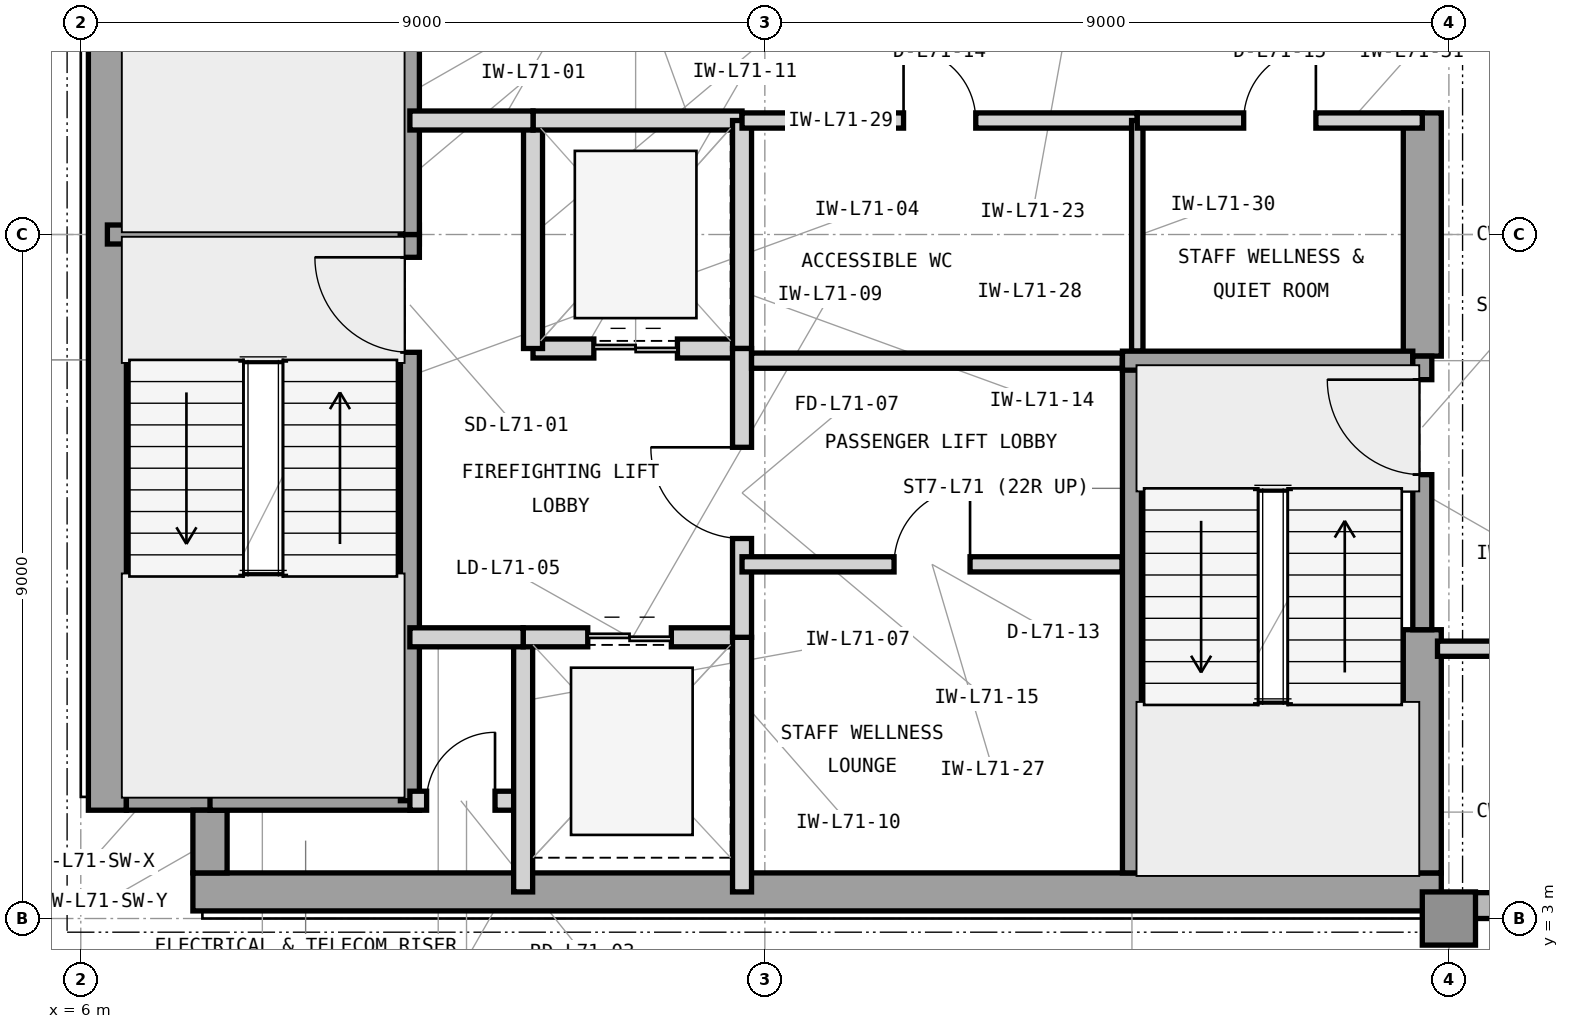
"""IFC4 building model, lengths in metres.
Left out: names, types, materials, properties, quantities, classifications, styles, units other than length and angle.
Written with IfcOpenShell. Run it as: python <this file> out.ifc"""

import sys

from ifc_helpers import new_model, si_unit, direction, frame, frame_2d, origin, origin_2d, place, context, subcontext, project, spatial, rectangle, extrude, element, fill, save


model = new_model("IFC4")
c1 = context("Model", 3, precision=1e-05, world=origin(), true_north=direction((0.0, 1.0)))
c2 = subcontext(c1, "Body", "Model", "MODEL_VIEW")
j1 = project(units=[si_unit("LENGTHUNIT", "METRE"), si_unit("PLANEANGLEUNIT", "RADIAN")], contexts=[c1])
p1 = place(None, origin())
s1 = spatial("IfcSite", under=j1, at=p1, CompositionType="ELEMENT")
p2 = place(p1, origin())
s2 = spatial("IfcBuilding", under=s1, at=p2, CompositionType="ELEMENT")
p3 = place(p2, frame((0.0, 0.0, 289.8)))
s3 = spatial("IfcBuildingStorey", under=s2, at=p3, CompositionType="ELEMENT", Elevation=289.8)
p4 = place(p3, frame((7.475, 3.35, 0.0), z_axis=(0.0, 0.0, 1.0), x_axis=(1.0, 0.0, 0.0)))
e1 = element("IfcWall", 1, at=p4, inside=s3, PredefinedType="SHEAR", context=c2, shape_type="SweptSolid", body=[
    extrude(rectangle(XDim=16.425, YDim=0.5, at=frame_2d((8.212, 0.0))), origin(), (0.0, 0.0, 1.0), 3.9),
])
p5 = place(p3, frame((6.35, 4.425, 0.0), z_axis=(0.0, 0.0, 1.0), x_axis=(0.0, 1.0, 0.0)))
e2 = element("IfcWall", 2, at=p5, inside=s3, PredefinedType="SHEAR", context=c2, shape_type="SweptSolid", body=[
    extrude(rectangle(XDim=15.15, YDim=0.5, at=frame_2d((7.575, 0.0))), origin(), (0.0, 0.0, 1.0), 3.9),
])
p6 = place(p3, frame((23.65, 3.6, 0.0), z_axis=(0.0, 0.0, 1.0), x_axis=(0.0, 1.0, 0.0)))
e3 = element("IfcWall", 3, at=p6, inside=s3, PredefinedType="SHEAR", context=c2, shape_type="SweptSolid", body=[
    extrude(rectangle(XDim=3.2, YDim=0.5, at=frame_2d((1.6, 0.0))), origin(), (0.0, 0.0, 1.0), 3.9),
])
p7 = place(p3, frame((23.65, 10.4, 0.0), z_axis=(0.0, 0.0, 1.0), x_axis=(0.0, 1.0, 0.0)))
e4 = element("IfcWall", 4, at=p7, inside=s3, PredefinedType="SHEAR", context=c2, shape_type="SweptSolid", body=[
    extrude(rectangle(XDim=3.2, YDim=0.5, at=frame_2d((1.6, 0.0))), origin(), (0.0, 0.0, 1.0), 3.9),
])
p8 = place(p3, frame((6.6, 4.65, 0.0), z_axis=(0.0, 0.0, 1.0), x_axis=(1.0, 0.0, 0.0)))
e5 = element("IfcWall", 5, at=p8, inside=s3, PredefinedType="SHEAR", context=c2, shape_type="SweptSolid", body=[
    extrude(rectangle(XDim=1.325, YDim=0.45, at=frame_2d((0.663, 0.0))), origin(), (0.0, 0.0, 1.0), 3.9),
])
p9 = place(p3, frame((7.7, 3.6, 0.0), z_axis=(0.0, 0.0, 1.0), x_axis=(0.0, 1.0, 0.0)))
e6 = element("IfcWall", 6, at=p9, inside=s3, PredefinedType="SHEAR", context=c2, shape_type="SweptSolid", body=[
    extrude(rectangle(XDim=0.825, YDim=0.45, at=frame_2d((0.413, 0.0))), origin(), (0.0, 0.0, 1.0), 3.9),
])
p10 = place(p3, frame((24.0, 3.0, 0.0), z_axis=(0.0, 0.0, 1.0), x_axis=(1.0, 0.0, 0.0)))
e7 = element("IfcColumn", 7, at=p10, inside=s3, PredefinedType="COLUMN", context=c2, shape_type="SweptSolid", body=[
    extrude(rectangle(XDim=0.7, YDim=0.7, at=origin_2d()), origin(), (0.0, 0.0, 1.0), 3.9),
])
p11 = place(p3, frame((23.9, 3.17, 0.0), z_axis=(0.0, 0.0, 1.0), x_axis=(1.0, 0.0, 0.0)))
e8 = element("IfcWall", 8, at=p11, inside=s3, PredefinedType="STANDARD", context=c2, shape_type="SweptSolid", body=[
    extrude(rectangle(XDim=25.5, YDim=0.34, at=frame_2d((12.75, 0.0))), origin(), (0.0, 0.0, 1.0), 3.715),
])
p12 = place(p11, frame((1.6, 0.0, 0.8)))
e9 = element("IfcOpeningElement", 9, at=p12, cuts=e8, PredefinedType="OPENING", context=c2, shape_type="SweptSolid", body=[
    extrude(rectangle(XDim=1.9, YDim=2.35, at=frame_2d((0.95, 1.175))), frame((0.0, 0.18, 0.0), z_axis=(0.0, -1.0, 0.0), x_axis=(1.0, 0.0, 0.0)), (0.0, 0.0, 1.0), 0.36),
])
p13 = place(p11, frame((11.45, 0.0, 0.8)))
e10 = element("IfcOpeningElement", 10, at=p13, cuts=e8, PredefinedType="OPENING", context=c2, shape_type="SweptSolid", body=[
    extrude(rectangle(XDim=2.6, YDim=2.35, at=frame_2d((1.3, 1.175))), frame((0.0, 0.18, 0.0), z_axis=(0.0, -1.0, 0.0), x_axis=(1.0, 0.0, 0.0)), (0.0, 0.0, 1.0), 0.36),
])
p14 = place(p11, frame((15.925, 0.0, 0.8)))
e11 = element("IfcOpeningElement", 11, at=p14, cuts=e8, PredefinedType="OPENING", context=c2, shape_type="SweptSolid", body=[
    extrude(rectangle(XDim=1.2, YDim=2.35, at=frame_2d((0.6, 1.175))), frame((0.0, 0.18, 0.0), z_axis=(0.0, -1.0, 0.0), x_axis=(1.0, 0.0, 0.0)), (0.0, 0.0, 1.0), 0.36),
])
p15 = place(p3, frame((6.35, 12.0, 0.0), z_axis=(0.0, 0.0, 1.0), x_axis=(1.0, 0.0, 0.0)))
e12 = element("IfcWall", 12, at=p15, inside=s3, PredefinedType="SHEAR", context=c2, shape_type="SweptSolid", body=[
    extrude(rectangle(XDim=4.105, YDim=0.25, at=frame_2d((2.052, 0.0))), origin(), (0.0, 0.0, 1.0), 3.9),
])
p16 = place(p3, frame((7.7, 4.55, 0.0), z_axis=(0.0, 0.0, 1.0), x_axis=(1.0, 0.0, 0.0)))
e13 = element("IfcWall", 13, at=p16, inside=s3, PredefinedType="SHEAR", context=c2, shape_type="SweptSolid", body=[
    extrude(rectangle(XDim=2.755, YDim=0.25, at=frame_2d((1.377, 0.0))), origin(), (0.0, 0.0, 1.0), 3.9),
])
p17 = place(p3, frame((10.33, 4.55, 0.0), z_axis=(0.0, 0.0, 1.0), x_axis=(0.0, 1.0, 0.0)))
e14 = element("IfcWall", 14, at=p17, inside=s3, PredefinedType="SHEAR", context=c2, shape_type="SweptSolid", body=[
    extrude(rectangle(XDim=7.45, YDim=0.25, at=frame_2d((3.725, 0.0))), origin(), (0.0, 0.0, 1.0), 3.9),
])
p18 = place(p17, frame((5.9, 0.0, 0.0)))
e15 = element("IfcOpeningElement", 15, at=p18, cuts=e14, PredefinedType="OPENING", context=c2, shape_type="SweptSolid", body=[
    extrude(rectangle(XDim=1.25, YDim=2.2, at=frame_2d((0.625, 1.1))), frame((0.0, 0.135, 0.0), z_axis=(0.0, -1.0, 0.0), x_axis=(1.0, 0.0, 0.0)), (0.0, 0.0, 1.0), 0.27),
])
p19 = place(p3, frame((10.33, 12.0, 0.0), z_axis=(0.0, 0.0, 1.0), x_axis=(0.0, 1.0, 0.0)))
e16 = element("IfcWall", 16, at=p19, inside=s3, PredefinedType="SHEAR", context=c2, shape_type="SweptSolid", body=[
    extrude(rectangle(XDim=7.45, YDim=0.25, at=frame_2d((3.725, 0.0))), origin(), (0.0, 0.0, 1.0), 3.9),
])
p20 = place(p19, frame((5.85, 0.0, 0.0)))
e17 = element("IfcOpeningElement", 17, at=p20, cuts=e16, PredefinedType="OPENING", context=c2, shape_type="SweptSolid", body=[
    extrude(rectangle(XDim=1.25, YDim=2.2, at=frame_2d((0.625, 1.1))), frame((0.0, 0.135, 0.0), z_axis=(0.0, -1.0, 0.0), x_axis=(1.0, 0.0, 0.0)), (0.0, 0.0, 1.0), 0.27),
])
p21 = place(p3, frame((10.33, 4.55, 0.0), z_axis=(0.0, 0.0, 1.0), x_axis=(1.0, 0.0, 0.0)))
e18 = element("IfcWall", 18, at=p21, inside=s3, PredefinedType="PARTITIONING", context=c2, shape_type="SweptSolid", body=[
    extrude(rectangle(XDim=1.49, YDim=0.25, at=frame_2d((0.745, 0.0))), origin(), (0.0, 0.0, 1.0), 3.705),
])
p22 = place(p21, frame((0.22, 0.0, 0.0)))
e19 = element("IfcOpeningElement", 19, at=p22, cuts=e18, PredefinedType="OPENING", context=c2, shape_type="SweptSolid", body=[
    extrude(rectangle(XDim=0.9, YDim=2.1, at=frame_2d((0.45, 1.05))), frame((0.0, 0.135, 0.0), z_axis=(0.0, -1.0, 0.0), x_axis=(1.0, 0.0, 0.0)), (0.0, 0.0, 1.0), 0.27),
])
p23 = place(p3, frame((11.82, 3.35, 0.0), z_axis=(0.0, 0.0, 1.0), x_axis=(0.0, 1.0, 0.0)))
e20 = element("IfcWall", 20, at=p23, inside=s3, PredefinedType="PARTITIONING", context=c2, shape_type="SweptSolid", body=[
    extrude(rectangle(XDim=3.35, YDim=0.25, at=frame_2d((1.675, 0.0))), origin(), (0.0, 0.0, 1.0), 3.705),
])
p24 = place(p3, frame((11.82, 6.7, 0.0), z_axis=(0.0, 0.0, 1.0), x_axis=(1.0, 0.0, 0.0)))
e21 = element("IfcWall", 21, at=p24, inside=s3, PredefinedType="PARTITIONING", context=c2, shape_type="SweptSolid", body=[
    extrude(rectangle(XDim=2.88, YDim=0.25, at=frame_2d((1.44, 0.0))), origin(), (0.0, 0.0, 1.0), 3.354),
])
p25 = place(p24, frame((0.85, 0.0, 0.0)))
e22 = element("IfcOpeningElement", 22, at=p25, cuts=e21, PredefinedType="OPENING", context=c2, shape_type="SweptSolid", body=[
    extrude(rectangle(XDim=1.1, YDim=2.25, at=frame_2d((0.55, 1.125))), frame((0.0, 0.135, 0.0), z_axis=(0.0, -1.0, 0.0), x_axis=(1.0, 0.0, 0.0)), (0.0, 0.0, 1.0), 0.27),
])
p26 = place(p3, frame((14.7, 3.35, 0.0), z_axis=(0.0, 0.0, 1.0), x_axis=(0.0, 1.0, 0.0)))
e23 = element("IfcWall", 23, at=p26, inside=s3, PredefinedType="PARTITIONING", context=c2, shape_type="SweptSolid", body=[
    extrude(rectangle(XDim=3.35, YDim=0.25, at=frame_2d((1.675, 0.0))), origin(), (0.0, 0.0, 1.0), 3.705),
])
p27 = place(p3, frame((11.95, 10.5, 0.0), z_axis=(0.0, 0.0, 1.0), x_axis=(1.0, 0.0, 0.0)))
e24 = element("IfcWall", 24, at=p27, inside=s3, PredefinedType="PARTITIONING", context=c2, shape_type="SweptSolid", body=[
    extrude(rectangle(XDim=2.75, YDim=0.25, at=frame_2d((1.375, 0.0))), origin(), (0.0, 0.0, 1.0), 3.354),
])
p28 = place(p27, frame((0.8, 0.0, 0.0)))
e25 = element("IfcOpeningElement", 25, at=p28, cuts=e24, PredefinedType="OPENING", context=c2, shape_type="SweptSolid", body=[
    extrude(rectangle(XDim=1.1, YDim=2.25, at=frame_2d((0.55, 1.125))), frame((0.0, 0.135, 0.0), z_axis=(0.0, -1.0, 0.0), x_axis=(1.0, 0.0, 0.0)), (0.0, 0.0, 1.0), 0.27),
])
p29 = place(p3, frame((11.95, 10.5, 0.0), z_axis=(0.0, 0.0, 1.0), x_axis=(0.0, 1.0, 0.0)))
e26 = element("IfcWall", 26, at=p29, inside=s3, PredefinedType="PARTITIONING", context=c2, shape_type="SweptSolid", body=[
    extrude(rectangle(XDim=3.0, YDim=0.25, at=frame_2d((1.5, 0.0))), origin(), (0.0, 0.0, 1.0), 3.705),
])
p30 = place(p3, frame((11.95, 13.5, 0.0), z_axis=(0.0, 0.0, 1.0), x_axis=(1.0, 0.0, 0.0)))
e27 = element("IfcWall", 27, at=p30, inside=s3, PredefinedType="PARTITIONING", context=c2, shape_type="SweptSolid", body=[
    extrude(rectangle(XDim=2.75, YDim=0.25, at=frame_2d((1.375, 0.0))), origin(), (0.0, 0.0, 1.0), 3.354),
])
p31 = place(p3, frame((14.7, 10.5, 0.0), z_axis=(0.0, 0.0, 1.0), x_axis=(0.0, 1.0, 0.0)))
e28 = element("IfcWall", 28, at=p31, inside=s3, PredefinedType="PARTITIONING", context=c2, shape_type="SweptSolid", body=[
    extrude(rectangle(XDim=3.0, YDim=0.25, at=frame_2d((1.5, 0.0))), origin(), (0.0, 0.0, 1.0), 3.705),
])
p32 = place(p3, frame((14.7, 6.7, 0.0), z_axis=(0.0, 0.0, 1.0), x_axis=(0.0, 1.0, 0.0)))
e29 = element("IfcWall", 29, at=p32, inside=s3, PredefinedType="PARTITIONING", context=c2, shape_type="SweptSolid", body=[
    extrude(rectangle(XDim=3.8, YDim=0.25, at=frame_2d((1.9, 0.0))), origin(), (0.0, 0.0, 1.0), 3.705),
])
p33 = place(p32, frame((1.3, 0.0, 0.0)))
e30 = element("IfcOpeningElement", 30, at=p33, cuts=e29, PredefinedType="OPENING", context=c2, shape_type="SweptSolid", body=[
    extrude(rectangle(XDim=1.2, YDim=2.2, at=frame_2d((0.6, 1.1))), frame((0.0, 0.135, 0.0), z_axis=(0.0, -1.0, 0.0), x_axis=(1.0, 0.0, 0.0)), (0.0, 0.0, 1.0), 0.27),
])
p34 = place(p3, frame((10.33, 13.5, 0.0), z_axis=(0.0, 0.0, 1.0), x_axis=(1.0, 0.0, 0.0)))
e31 = element("IfcWall", 31, at=p34, inside=s3, PredefinedType="PARTITIONING", context=c2, shape_type="SweptSolid", body=[
    extrude(rectangle(XDim=1.62, YDim=0.25, at=frame_2d((0.81, 0.0))), origin(), (0.0, 0.0, 1.0), 3.354),
])
p35 = place(p3, frame((10.33, 6.7, 0.0), z_axis=(0.0, 0.0, 1.0), x_axis=(1.0, 0.0, 0.0)))
e32 = element("IfcWall", 32, at=p35, inside=s3, PredefinedType="PARTITIONING", context=c2, shape_type="SweptSolid", body=[
    extrude(rectangle(XDim=1.49, YDim=0.25, at=frame_2d((0.745, 0.0))), origin(), (0.0, 0.0, 1.0), 3.354),
])
p36 = place(p3, frame((14.7, 7.66, 0.0), z_axis=(0.0, 0.0, 1.0), x_axis=(1.0, 0.0, 0.0)))
e33 = element("IfcWall", 33, at=p36, inside=s3, PredefinedType="PARTITIONING", context=c2, shape_type="SweptSolid", body=[
    extrude(rectangle(XDim=5.0, YDim=0.2, at=frame_2d((2.5, 0.0))), origin(), (0.0, 0.0, 1.0), 3.705),
])
p37 = place(p36, frame((2.0, 0.0, 0.0)))
e34 = element("IfcOpeningElement", 34, at=p37, cuts=e33, PredefinedType="OPENING", context=c2, shape_type="SweptSolid", body=[
    extrude(rectangle(XDim=1.0, YDim=2.15, at=frame_2d((0.5, 1.075))), frame((0.0, 0.11, 0.0), z_axis=(0.0, -1.0, 0.0), x_axis=(1.0, 0.0, 0.0)), (0.0, 0.0, 1.0), 0.22),
])
p38 = place(p3, frame((14.825, 10.34, 0.0), z_axis=(0.0, 0.0, 1.0), x_axis=(1.0, 0.0, 0.0)))
e35 = element("IfcWall", 35, at=p38, inside=s3, PredefinedType="PARTITIONING", context=c2, shape_type="SweptSolid", body=[
    extrude(rectangle(XDim=4.88, YDim=0.2, at=frame_2d((2.44, 0.0))), origin(), (0.0, 0.0, 1.0), 3.705),
])
p39 = place(p3, frame((14.7, 13.5, 0.0), z_axis=(0.0, 0.0, 1.0), x_axis=(1.0, 0.0, 0.0)))
e36 = element("IfcWall", 36, at=p39, inside=s3, PredefinedType="PARTITIONING", context=c2, shape_type="SweptSolid", body=[
    extrude(rectangle(XDim=5.2, YDim=0.2, at=frame_2d((2.6, 0.0))), origin(), (0.0, 0.0, 1.0), 3.354),
])
p40 = place(p39, frame((2.125, 0.0, 0.0)))
e37 = element("IfcOpeningElement", 37, at=p40, cuts=e36, PredefinedType="OPENING", context=c2, shape_type="SweptSolid", body=[
    extrude(rectangle(XDim=0.95, YDim=2.1, at=frame_2d((0.475, 1.05))), frame((0.0, 0.11, 0.0), z_axis=(0.0, -1.0, 0.0), x_axis=(1.0, 0.0, 0.0)), (0.0, 0.0, 1.0), 0.22),
])
p41 = place(p3, frame((19.9, 10.465, 0.0), z_axis=(0.0, 0.0, 1.0), x_axis=(0.0, 1.0, 0.0)))
e38 = element("IfcWall", 38, at=p41, inside=s3, PredefinedType="PARTITIONING", context=c2, shape_type="SweptSolid", body=[
    extrude(rectangle(XDim=3.035, YDim=0.15, at=frame_2d((1.518, 0.0))), origin(), (0.0, 0.0, 1.0), 3.705),
])
p42 = place(p3, frame((19.9, 13.5, 0.0), z_axis=(0.0, 0.0, 1.0), x_axis=(1.0, 0.0, 0.0)))
e39 = element("IfcWall", 39, at=p42, inside=s3, PredefinedType="PARTITIONING", context=c2, shape_type="SweptSolid", body=[
    extrude(rectangle(XDim=3.75, YDim=0.2, at=frame_2d((1.875, 0.0))), origin(), (0.0, 0.0, 1.0), 3.354),
])
p43 = place(p42, frame((1.4, 0.0, 0.0)))
e40 = element("IfcOpeningElement", 40, at=p43, cuts=e39, PredefinedType="OPENING", context=c2, shape_type="SweptSolid", body=[
    extrude(rectangle(XDim=0.95, YDim=2.1, at=frame_2d((0.475, 1.05))), frame((0.0, 0.11, 0.0), z_axis=(0.0, -1.0, 0.0), x_axis=(1.0, 0.0, 0.0)), (0.0, 0.0, 1.0), 0.22),
])
p44 = place(p3, frame((23.85, 6.55, 0.0), z_axis=(0.0, 0.0, 1.0), x_axis=(1.0, 0.0, 0.0)))
e41 = element("IfcWall", 41, at=p44, inside=s3, PredefinedType="PARTITIONING", context=c2, shape_type="SweptSolid", body=[
    extrude(rectangle(XDim=7.35, YDim=0.2, at=frame_2d((3.675, 0.0))), origin(), (0.0, 0.0, 1.0), 3.705),
])
p45 = place(p44, frame((2.8, 0.0, 0.0)))
e42 = element("IfcOpeningElement", 42, at=p45, cuts=e41, PredefinedType="OPENING", context=c2, shape_type="SweptSolid", body=[
    extrude(rectangle(XDim=1.0, YDim=2.15, at=frame_2d((0.5, 1.075))), frame((0.0, 0.11, 0.0), z_axis=(0.0, -1.0, 0.0), x_axis=(1.0, 0.0, 0.0)), (0.0, 0.0, 1.0), 0.22),
])
p46 = place(p3, frame((19.83, 3.6, 0.0), z_axis=(0.0, 0.0, 1.0), x_axis=(0.0, 1.0, 0.0)))
e43 = element("IfcWall", 43, at=p46, inside=s3, PredefinedType="SHEAR", context=c2, shape_type="SweptSolid", body=[
    extrude(rectangle(XDim=6.74, YDim=0.25, at=frame_2d((3.37, 0.0))), origin(), (0.0, 0.0, 1.0), 3.9),
])
p47 = place(p3, frame((19.705, 10.34, 0.0), z_axis=(0.0, 0.0, 1.0), x_axis=(1.0, 0.0, 0.0)))
e44 = element("IfcWall", 44, at=p47, inside=s3, PredefinedType="SHEAR", context=c2, shape_type="SweptSolid", body=[
    extrude(rectangle(XDim=3.82, YDim=0.25, at=frame_2d((1.91, 0.0))), origin(), (0.0, 0.0, 1.0), 3.9),
])
p48 = place(p3, frame((23.65, 6.8, 0.0), z_axis=(0.0, 0.0, 1.0), x_axis=(0.0, 1.0, 0.0)))
e45 = element("IfcWall", 45, at=p48, inside=s3, PredefinedType="SHEAR", context=c2, shape_type="SweptSolid", body=[
    extrude(rectangle(XDim=3.6, YDim=0.25, at=frame_2d((1.8, 0.0))), origin(), (0.0, 0.0, 1.0), 3.9),
])
p49 = place(p48, frame((2.04, 0.0, 0.0)))
e46 = element("IfcOpeningElement", 46, at=p49, cuts=e45, PredefinedType="OPENING", context=c2, shape_type="SweptSolid", body=[
    extrude(rectangle(XDim=1.25, YDim=2.2, at=frame_2d((0.625, 1.1))), frame((0.0, 0.135, 0.0), z_axis=(0.0, -1.0, 0.0), x_axis=(1.0, 0.0, 0.0)), (0.0, 0.0, 1.0), 0.27),
])
p50 = place(p18, origin())
e47 = element("IfcDoor", 47, at=p50, inside=s3, OperationType="SINGLE_SWING_RIGHT", PredefinedType="DOOR", context=c2, shape_type="SweptSolid", body=[
    extrude(rectangle(XDim=1.25, YDim=2.2, at=frame_2d((0.625, 1.1))), frame((0.0, 0.025, 0.0), z_axis=(0.0, -1.0, 0.0), x_axis=(1.0, 0.0, 0.0)), (0.0, 0.0, 1.0), 0.05),
])
fill(e15, e47)
p51 = place(p22, origin())
e48 = element("IfcDoor", 48, at=p51, inside=s3, OperationType="SINGLE_SWING_RIGHT", PredefinedType="TRAPDOOR", context=c2, shape_type="SweptSolid", body=[
    extrude(rectangle(XDim=0.9, YDim=2.1, at=frame_2d((0.45, 1.05))), frame((0.0, 0.025, 0.0), z_axis=(0.0, -1.0, 0.0), x_axis=(1.0, 0.0, 0.0)), (0.0, 0.0, 1.0), 0.05),
])
fill(e19, e48)
p52 = place(p25, origin())
e49 = element("IfcDoor", 49, at=p52, inside=s3, OperationType="DOUBLE_DOOR_SLIDING", PredefinedType="DOOR", context=c2, shape_type="SweptSolid", body=[
    extrude(rectangle(XDim=1.1, YDim=2.25, at=frame_2d((0.55, 1.125))), frame((0.0, 0.025, 0.0), z_axis=(0.0, -1.0, 0.0), x_axis=(1.0, 0.0, 0.0)), (0.0, 0.0, 1.0), 0.05),
])
fill(e22, e49)
p53 = place(p28, origin())
e50 = element("IfcDoor", 50, at=p53, inside=s3, OperationType="DOUBLE_DOOR_SLIDING", PredefinedType="DOOR", context=c2, shape_type="SweptSolid", body=[
    extrude(rectangle(XDim=1.1, YDim=2.25, at=frame_2d((0.55, 1.125))), frame((0.0, 0.025, 0.0), z_axis=(0.0, -1.0, 0.0), x_axis=(1.0, 0.0, 0.0)), (0.0, 0.0, 1.0), 0.05),
])
fill(e25, e50)
p54 = place(p33, origin())
e51 = element("IfcDoor", 51, at=p54, inside=s3, OperationType="SINGLE_SWING_RIGHT", PredefinedType="DOOR", context=c2, shape_type="SweptSolid", body=[
    extrude(rectangle(XDim=1.2, YDim=2.2, at=frame_2d((0.6, 1.1))), frame((0.0, 0.025, 0.0), z_axis=(0.0, -1.0, 0.0), x_axis=(1.0, 0.0, 0.0)), (0.0, 0.0, 1.0), 0.05),
])
fill(e30, e51)
p55 = place(p37, origin())
e52 = element("IfcDoor", 52, at=p55, inside=s3, OperationType="SINGLE_SWING_RIGHT", PredefinedType="DOOR", context=c2, shape_type="SweptSolid", body=[
    extrude(rectangle(XDim=1.0, YDim=2.15, at=frame_2d((0.5, 1.075))), frame((0.0, 0.025, 0.0), z_axis=(0.0, -1.0, 0.0), x_axis=(1.0, 0.0, 0.0)), (0.0, 0.0, 1.0), 0.05),
])
fill(e34, e52)
p56 = place(p40, origin())
e53 = element("IfcDoor", 53, at=p56, inside=s3, OperationType="SINGLE_SWING_LEFT", PredefinedType="DOOR", context=c2, shape_type="SweptSolid", body=[
    extrude(rectangle(XDim=0.95, YDim=2.1, at=frame_2d((0.475, 1.05))), frame((0.0, 0.025, 0.0), z_axis=(0.0, -1.0, 0.0), x_axis=(1.0, 0.0, 0.0)), (0.0, 0.0, 1.0), 0.05),
])
fill(e37, e53)
p57 = place(p43, origin())
e54 = element("IfcDoor", 54, at=p57, inside=s3, OperationType="SINGLE_SWING_RIGHT", PredefinedType="DOOR", context=c2, shape_type="SweptSolid", body=[
    extrude(rectangle(XDim=0.95, YDim=2.1, at=frame_2d((0.475, 1.05))), frame((0.0, 0.025, 0.0), z_axis=(0.0, -1.0, 0.0), x_axis=(1.0, 0.0, 0.0)), (0.0, 0.0, 1.0), 0.05),
])
fill(e40, e54)
p58 = place(p49, origin())
e55 = element("IfcDoor", 55, at=p58, inside=s3, OperationType="SINGLE_SWING_RIGHT", PredefinedType="DOOR", context=c2, shape_type="SweptSolid", body=[
    extrude(rectangle(XDim=1.25, YDim=2.2, at=frame_2d((0.625, 1.1))), frame((0.0, 0.025, 0.0), z_axis=(0.0, -1.0, 0.0), x_axis=(1.0, 0.0, 0.0)), (0.0, 0.0, 1.0), 0.05),
])
fill(e46, e55)
save(model, sys.argv[1])
